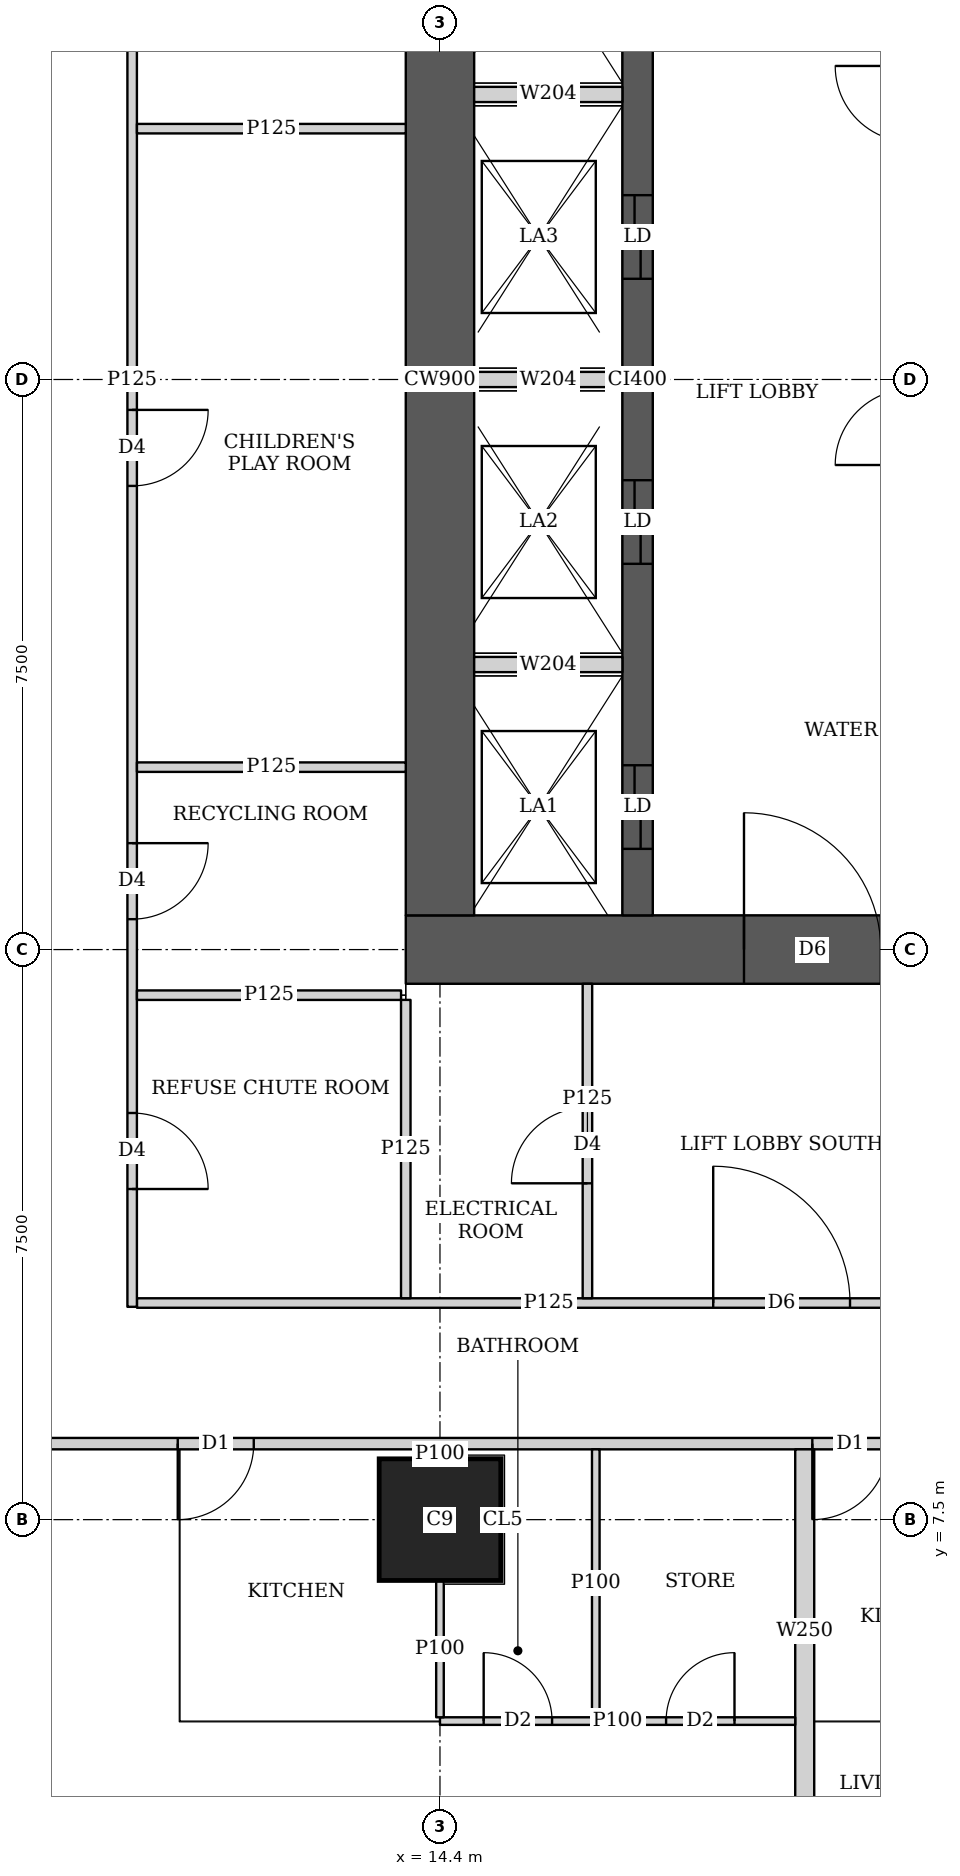
"""IFC4 building model, lengths in metres.
Left out: names, types, materials, properties, quantities, classifications, styles, units other than length and angle.
Written with IfcOpenShell. Run it as: python <this file> out.ifc"""

import sys

from ifc_helpers import new_model, si_unit, direction, frame, frame_2d, origin, origin_2d, place, context, subcontext, project, spatial, rectangle, extrude, element, fill, save


model = new_model("IFC4")
c1 = context("Model", 3, precision=1e-05, world=origin(), true_north=direction((0.0, 1.0)))
c2 = subcontext(c1, "Body", "Model", "MODEL_VIEW")
j1 = project(units=[si_unit("LENGTHUNIT", "METRE"), si_unit("PLANEANGLEUNIT", "RADIAN")], contexts=[c1])
p1 = place(None, origin())
s1 = spatial("IfcSite", under=j1, at=p1, CompositionType="ELEMENT")
p2 = place(p1, origin())
s2 = spatial("IfcBuilding", under=s1, at=p2, CompositionType="ELEMENT")
p3 = place(p2, frame((0.0, 0.0, 111.65)))
s3 = spatial("IfcBuildingStorey", under=s2, at=p3, CompositionType="ELEMENT", Elevation=111.65)
p4 = place(p3, frame((14.4, 7.5, 0.0), z_axis=(0.0, 0.0, 1.0), x_axis=(1.0, 0.0, 0.0)))
e1 = element("IfcColumn", 1, at=p4, inside=s3, PredefinedType="COLUMN", context=c2, shape_type="SweptSolid", body=[
    extrude(rectangle(XDim=1.6, YDim=1.6, at=origin_2d()), origin(), (0.0, 0.0, 1.0), 3.75),
])
p5 = place(p3, frame((13.95, 15.0, 0.0), z_axis=(0.0, 0.0, 1.0), x_axis=(1.0, 0.0, 0.0)))
e2 = element("IfcWall", 2, at=p5, inside=s3, PredefinedType="SHEAR", context=c2, shape_type="SweptSolid", body=[
    extrude(rectangle(XDim=15.3, YDim=0.9, at=frame_2d((7.65, 0.0))), origin(), (0.0, 0.0, 1.0), 3.75),
])
p6 = place(p5, frame((4.45, 0.0, 0.0)))
e3 = element("IfcOpeningElement", 3, at=p6, cuts=e2, PredefinedType="OPENING", context=c2, shape_type="SweptSolid", body=[
    extrude(rectangle(XDim=1.8, YDim=2.1, at=frame_2d((0.9, 1.05))), frame((0.0, 0.46, 0.0), z_axis=(0.0, -1.0, 0.0), x_axis=(1.0, 0.0, 0.0)), (0.0, 0.0, 1.0), 0.92),
])
p7 = place(p5, frame((10.7, 0.0, 0.0)))
e4 = element("IfcOpeningElement", 4, at=p7, cuts=e2, PredefinedType="OPENING", context=c2, shape_type="SweptSolid", body=[
    extrude(rectangle(XDim=1.1, YDim=2.1, at=frame_2d((0.55, 1.05))), frame((0.0, 0.46, 0.0), z_axis=(0.0, -1.0, 0.0), x_axis=(1.0, 0.0, 0.0)), (0.0, 0.0, 1.0), 0.92),
])
p8 = place(p3, frame((14.4, 15.45, 0.0), z_axis=(0.0, 0.0, 1.0), x_axis=(0.0, 1.0, 0.0)))
e5 = element("IfcWall", 5, at=p8, inside=s3, PredefinedType="SHEAR", context=c2, shape_type="SweptSolid", body=[
    extrude(rectangle(XDim=14.1, YDim=0.9, at=frame_2d((7.05, 0.0))), origin(), (0.0, 0.0, 1.0), 3.75),
])
p9 = place(p3, frame((17.0, 15.45, 0.0), z_axis=(0.0, 0.0, 1.0), x_axis=(0.0, 1.0, 0.0)))
e6 = element("IfcWall", 6, at=p9, inside=s3, PredefinedType="SHEAR", context=c2, shape_type="SweptSolid", body=[
    extrude(rectangle(XDim=14.1, YDim=0.4, at=frame_2d((7.05, 0.0))), origin(), (0.0, 0.0, 1.0), 3.75),
])
p10 = place(p9, frame((0.875, 0.0, 0.0)))
e7 = element("IfcOpeningElement", 7, at=p10, cuts=e6, PredefinedType="OPENING", context=c2, shape_type="SweptSolid", body=[
    extrude(rectangle(XDim=1.1, YDim=2.1, at=frame_2d((0.55, 1.05))), frame((0.0, 0.21, 0.0), z_axis=(0.0, -1.0, 0.0), x_axis=(1.0, 0.0, 0.0)), (0.0, 0.0, 1.0), 0.42),
])
p11 = place(p9, frame((4.625, 0.0, 0.0)))
e8 = element("IfcOpeningElement", 8, at=p11, cuts=e6, PredefinedType="OPENING", context=c2, shape_type="SweptSolid", body=[
    extrude(rectangle(XDim=1.1, YDim=2.1, at=frame_2d((0.55, 1.05))), frame((0.0, 0.21, 0.0), z_axis=(0.0, -1.0, 0.0), x_axis=(1.0, 0.0, 0.0)), (0.0, 0.0, 1.0), 0.42),
])
p12 = place(p9, frame((8.375, 0.0, 0.0)))
e9 = element("IfcOpeningElement", 9, at=p12, cuts=e6, PredefinedType="OPENING", context=c2, shape_type="SweptSolid", body=[
    extrude(rectangle(XDim=1.1, YDim=2.1, at=frame_2d((0.55, 1.05))), frame((0.0, 0.21, 0.0), z_axis=(0.0, -1.0, 0.0), x_axis=(1.0, 0.0, 0.0)), (0.0, 0.0, 1.0), 0.42),
])
p13 = place(p9, frame((12.125, 0.0, 0.0)))
e10 = element("IfcOpeningElement", 10, at=p13, cuts=e6, PredefinedType="OPENING", context=c2, shape_type="SweptSolid", body=[
    extrude(rectangle(XDim=1.1, YDim=2.1, at=frame_2d((0.55, 1.05))), frame((0.0, 0.21, 0.0), z_axis=(0.0, -1.0, 0.0), x_axis=(1.0, 0.0, 0.0)), (0.0, 0.0, 1.0), 0.42),
])
p14 = place(p3, frame((40.053, 8.5, 0.0), z_axis=(0.0, 0.0, 1.0), x_axis=(-1.0, 0.0, 0.0)))
e11 = element("IfcWall", 11, at=p14, inside=s3, PredefinedType="SOLIDWALL", context=c2, shape_type="SweptSolid", body=[
    extrude(rectangle(XDim=31.703, YDim=0.15, at=frame_2d((15.852, 0.0))), origin(), (0.0, 0.0, 1.0), 3.5),
])
p15 = place(p14, frame((28.103, 0.0, 0.0)))
e12 = element("IfcOpeningElement", 12, at=p15, cuts=e11, PredefinedType="OPENING", context=c2, shape_type="SweptSolid", body=[
    extrude(rectangle(XDim=1.0, YDim=2.1, at=frame_2d((0.5, 1.05))), frame((0.0, 0.085, 0.0), z_axis=(0.0, -1.0, 0.0), x_axis=(1.0, 0.0, 0.0)), (0.0, 0.0, 1.0), 0.17),
])
p16 = place(p14, frame((19.754, 0.0, 0.0)))
e13 = element("IfcOpeningElement", 13, at=p16, cuts=e11, PredefinedType="OPENING", context=c2, shape_type="SweptSolid", body=[
    extrude(rectangle(XDim=1.0, YDim=2.1, at=frame_2d((0.5, 1.05))), frame((0.0, 0.085, 0.0), z_axis=(0.0, -1.0, 0.0), x_axis=(1.0, 0.0, 0.0)), (0.0, 0.0, 1.0), 0.17),
])
p17 = place(p14, frame((8.353, 0.0, 0.0)))
e14 = element("IfcOpeningElement", 14, at=p17, cuts=e11, PredefinedType="OPENING", context=c2, shape_type="SweptSolid", body=[
    extrude(rectangle(XDim=1.0, YDim=2.1, at=frame_2d((0.5, 1.05))), frame((0.0, 0.085, 0.0), z_axis=(0.0, -1.0, 0.0), x_axis=(1.0, 0.0, 0.0)), (0.0, 0.0, 1.0), 0.17),
])
p18 = place(p3, frame((19.074, 4.85, 0.0), z_axis=(0.0, 0.0, 1.0), x_axis=(-1.0, 0.0, 0.0)))
e15 = element("IfcWall", 15, at=p18, inside=s3, PredefinedType="PARTITIONING", context=c2, shape_type="SweptSolid", body=[
    extrude(rectangle(XDim=4.674, YDim=0.1, at=frame_2d((2.337, 0.0))), origin(), (0.0, 0.0, 1.0), 3.5),
])
p19 = place(p18, frame((3.199, 0.0, 0.0)))
e16 = element("IfcOpeningElement", 16, at=p19, cuts=e15, PredefinedType="OPENING", context=c2, shape_type="SweptSolid", body=[
    extrude(rectangle(XDim=0.9, YDim=2.1, at=frame_2d((0.45, 1.05))), frame((0.0, 0.06, 0.0), z_axis=(0.0, -1.0, 0.0), x_axis=(1.0, 0.0, 0.0)), (0.0, 0.0, 1.0), 0.12),
])
p20 = place(p18, frame((0.799, 0.0, 0.0)))
e17 = element("IfcOpeningElement", 17, at=p20, cuts=e15, PredefinedType="OPENING", context=c2, shape_type="SweptSolid", body=[
    extrude(rectangle(XDim=0.9, YDim=2.1, at=frame_2d((0.45, 1.05))), frame((0.0, 0.06, 0.0), z_axis=(0.0, -1.0, 0.0), x_axis=(1.0, 0.0, 0.0)), (0.0, 0.0, 1.0), 0.12),
])
p21 = place(p3, frame((14.4, 4.9, 0.0), z_axis=(0.0, 0.0, 1.0), x_axis=(0.0, 1.0, 0.0)))
e18 = element("IfcWall", 18, at=p21, inside=s3, PredefinedType="PARTITIONING", context=c2, shape_type="SweptSolid", body=[
    extrude(rectangle(XDim=1.799, YDim=0.1, at=frame_2d((0.899, 0.0))), origin(), (0.0, 0.0, 1.0), 3.5),
])
p22 = place(p3, frame((14.4, 8.301, 0.0), z_axis=(0.0, 0.0, 1.0), x_axis=(0.0, 1.0, 0.0)))
e19 = element("IfcWall", 19, at=p22, inside=s3, PredefinedType="PARTITIONING", context=c2, shape_type="SweptSolid", body=[
    extrude(rectangle(XDim=0.124, YDim=0.1, at=frame_2d((0.062, 0.0))), origin(), (0.0, 0.0, 1.0), 3.5),
])
p23 = place(p3, frame((16.45, 4.9, 0.0), z_axis=(0.0, 0.0, 1.0), x_axis=(0.0, 1.0, 0.0)))
e20 = element("IfcWall", 20, at=p23, inside=s3, PredefinedType="PARTITIONING", context=c2, shape_type="SweptSolid", body=[
    extrude(rectangle(XDim=3.525, YDim=0.1, at=frame_2d((1.763, 0.0))), origin(), (0.0, 0.0, 1.0), 3.5),
])
p24 = place(p3, frame((19.199, 3.65, 0.0), z_axis=(0.0, 0.0, 1.0), x_axis=(0.0, 1.0, 0.0)))
e21 = element("IfcWall", 21, at=p24, inside=s3, PredefinedType="SOLIDWALL", context=c2, shape_type="SweptSolid", body=[
    extrude(rectangle(XDim=4.775, YDim=0.25, at=frame_2d((2.388, 0.0))), origin(), (0.0, 0.0, 1.0), 3.5),
])
p25 = place(p3, frame((10.35, 10.3, 0.0), z_axis=(0.0, 0.0, 1.0), x_axis=(0.0, 1.0, 0.0)))
e22 = element("IfcWall", 22, at=p25, inside=s3, PredefinedType="PARTITIONING", context=c2, shape_type="SweptSolid", body=[
    extrude(rectangle(XDim=24.4, YDim=0.125, at=frame_2d((12.2, 0.0))), origin(), (0.0, 0.0, 1.0), 3.5),
])
p26 = place(p25, frame((1.55, 0.0, 0.0)))
e23 = element("IfcOpeningElement", 23, at=p26, cuts=e22, PredefinedType="OPENING", context=c2, shape_type="SweptSolid", body=[
    extrude(rectangle(XDim=1.0, YDim=2.1, at=frame_2d((0.5, 1.05))), frame((0.0, 0.073, 0.0), z_axis=(0.0, -1.0, 0.0), x_axis=(1.0, 0.0, 0.0)), (0.0, 0.0, 1.0), 0.145),
])
p27 = place(p25, frame((5.1, 0.0, 0.0)))
e24 = element("IfcOpeningElement", 24, at=p27, cuts=e22, PredefinedType="OPENING", context=c2, shape_type="SweptSolid", body=[
    extrude(rectangle(XDim=1.0, YDim=2.1, at=frame_2d((0.5, 1.05))), frame((0.0, 0.073, 0.0), z_axis=(0.0, -1.0, 0.0), x_axis=(1.0, 0.0, 0.0)), (0.0, 0.0, 1.0), 0.145),
])
p28 = place(p25, frame((10.8, 0.0, 0.0)))
e25 = element("IfcOpeningElement", 25, at=p28, cuts=e22, PredefinedType="OPENING", context=c2, shape_type="SweptSolid", body=[
    extrude(rectangle(XDim=1.0, YDim=2.1, at=frame_2d((0.5, 1.05))), frame((0.0, 0.073, 0.0), z_axis=(0.0, -1.0, 0.0), x_axis=(1.0, 0.0, 0.0)), (0.0, 0.0, 1.0), 0.145),
])
p29 = place(p25, frame((18.1, 0.0, 0.0)))
e26 = element("IfcOpeningElement", 26, at=p29, cuts=e22, PredefinedType="OPENING", context=c2, shape_type="SweptSolid", body=[
    extrude(rectangle(XDim=1.0, YDim=2.1, at=frame_2d((0.5, 1.05))), frame((0.0, 0.073, 0.0), z_axis=(0.0, -1.0, 0.0), x_axis=(1.0, 0.0, 0.0)), (0.0, 0.0, 1.0), 0.145),
])
p30 = place(p25, frame((22.55, 0.0, 0.0)))
e27 = element("IfcOpeningElement", 27, at=p30, cuts=e22, PredefinedType="OPENING", context=c2, shape_type="SweptSolid", body=[
    extrude(rectangle(XDim=1.0, YDim=2.1, at=frame_2d((0.5, 1.05))), frame((0.0, 0.073, 0.0), z_axis=(0.0, -1.0, 0.0), x_axis=(1.0, 0.0, 0.0)), (0.0, 0.0, 1.0), 0.145),
])
p31 = place(p3, frame((10.413, 14.4, 0.0), z_axis=(0.0, 0.0, 1.0), x_axis=(1.0, 0.0, 0.0)))
e28 = element("IfcWall", 28, at=p31, inside=s3, PredefinedType="PARTITIONING", context=c2, shape_type="SweptSolid", body=[
    extrude(rectangle(XDim=3.475, YDim=0.125, at=frame_2d((1.737, 0.0))), origin(), (0.0, 0.0, 1.0), 3.5),
])
for number, where, z_axis, x_axis in (
    (29, (10.413, 17.4, 0.0), (0.0, 0.0, 1.0), (1.0, 0.0, 0.0)),
    (30, (10.413, 25.8, 0.0), (0.0, 0.0, 1.0), (1.0, 0.0, 0.0)),
):
    element("IfcWall", number, at=place(p3, frame(where, z_axis=z_axis, x_axis=x_axis)), inside=s3, PredefinedType="PARTITIONING", context=c2, shape_type="SweptSolid", body=[
        extrude(rectangle(XDim=3.537, YDim=0.125, at=frame_2d((1.769, 0.0))), origin(), (0.0, 0.0, 1.0), 3.5),
    ])
p32 = place(p3, frame((13.95, 10.413, 0.0), z_axis=(0.0, 0.0, 1.0), x_axis=(0.0, 1.0, 0.0)))
e31 = element("IfcWall", 31, at=p32, inside=s3, PredefinedType="PARTITIONING", context=c2, shape_type="SweptSolid", body=[
    extrude(rectangle(XDim=3.925, YDim=0.125, at=frame_2d((1.962, 0.0))), origin(), (0.0, 0.0, 1.0), 3.5),
])
p33 = place(p3, frame((10.413, 10.35, 0.0), z_axis=(0.0, 0.0, 1.0), x_axis=(1.0, 0.0, 0.0)))
e32 = element("IfcWall", 32, at=p33, inside=s3, PredefinedType="PARTITIONING", context=c2, shape_type="SweptSolid", body=[
    extrude(rectangle(XDim=10.837, YDim=0.125, at=frame_2d((5.418, 0.0))), origin(), (0.0, 0.0, 1.0), 3.5),
])
p34 = place(p33, frame((7.582, 0.0, 0.0)))
e33 = element("IfcOpeningElement", 33, at=p34, cuts=e32, PredefinedType="OPENING", context=c2, shape_type="SweptSolid", body=[
    extrude(rectangle(XDim=1.8, YDim=2.1, at=frame_2d((0.9, 1.05))), frame((0.0, 0.073, 0.0), z_axis=(0.0, -1.0, 0.0), x_axis=(1.0, 0.0, 0.0)), (0.0, 0.0, 1.0), 0.145),
])
p35 = place(p3, frame((16.34, 10.413, 0.0), z_axis=(0.0, 0.0, 1.0), x_axis=(0.0, 1.0, 0.0)))
e34 = element("IfcWall", 34, at=p35, inside=s3, PredefinedType="PARTITIONING", context=c2, shape_type="SweptSolid", body=[
    extrude(rectangle(XDim=4.137, YDim=0.125, at=frame_2d((2.068, 0.0))), origin(), (0.0, 0.0, 1.0), 3.5),
])
p36 = place(p35, frame((1.512, 0.0, 0.0)))
e35 = element("IfcOpeningElement", 35, at=p36, cuts=e34, PredefinedType="OPENING", context=c2, shape_type="SweptSolid", body=[
    extrude(rectangle(XDim=1.0, YDim=2.1, at=frame_2d((0.5, 1.05))), frame((0.0, 0.073, 0.0), z_axis=(0.0, -1.0, 0.0), x_axis=(1.0, 0.0, 0.0)), (0.0, 0.0, 1.0), 0.145),
])
for number, where, z_axis, x_axis in (
    (36, (14.85, 18.75, 0.0), (0.0, 0.0, 1.0), (1.0, 0.0, 0.0)),
    (37, (14.85, 22.5, 0.0), (0.0, 0.0, 1.0), (1.0, 0.0, 0.0)),
    (38, (14.85, 26.25, 0.0), (0.0, 0.0, 1.0), (1.0, 0.0, 0.0)),
):
    element("IfcWall", number, at=place(p3, frame(where, z_axis=z_axis, x_axis=x_axis)), inside=s3, PredefinedType="SOLIDWALL", context=c2, shape_type="SweptSolid", body=[
        extrude(rectangle(XDim=1.95, YDim=0.2, at=frame_2d((0.975, 0.0))), origin(), (0.0, 0.0, 1.0), 3.5),
    ])
p37 = place(p19, origin())
e39 = element("IfcDoor", 39, at=p37, inside=s3, OperationType="SINGLE_SWING_LEFT", PredefinedType="DOOR", context=c2, shape_type="SweptSolid", body=[
    extrude(rectangle(XDim=0.9, YDim=2.1, at=frame_2d((0.45, 1.05))), frame((0.0, 0.025, 0.0), z_axis=(0.0, -1.0, 0.0), x_axis=(1.0, 0.0, 0.0)), (0.0, 0.0, 1.0), 0.05),
])
fill(e16, e39)
p38 = place(p20, origin())
e40 = element("IfcDoor", 40, at=p38, inside=s3, OperationType="SINGLE_SWING_RIGHT", PredefinedType="DOOR", context=c2, shape_type="SweptSolid", body=[
    extrude(rectangle(XDim=0.9, YDim=2.1, at=frame_2d((0.45, 1.05))), frame((0.0, 0.025, 0.0), z_axis=(0.0, -1.0, 0.0), x_axis=(1.0, 0.0, 0.0)), (0.0, 0.0, 1.0), 0.05),
])
fill(e17, e40)
p39 = place(p15, origin())
e41 = element("IfcDoor", 41, at=p39, inside=s3, OperationType="SINGLE_SWING_RIGHT", PredefinedType="DOOR", context=c2, shape_type="SweptSolid", body=[
    extrude(rectangle(XDim=1.0, YDim=2.1, at=frame_2d((0.5, 1.05))), frame((0.0, 0.025, 0.0), z_axis=(0.0, -1.0, 0.0), x_axis=(1.0, 0.0, 0.0)), (0.0, 0.0, 1.0), 0.05),
])
fill(e12, e41)
p40 = place(p16, origin())
e42 = element("IfcDoor", 42, at=p40, inside=s3, OperationType="SINGLE_SWING_RIGHT", PredefinedType="DOOR", context=c2, shape_type="SweptSolid", body=[
    extrude(rectangle(XDim=1.0, YDim=2.1, at=frame_2d((0.5, 1.05))), frame((0.0, 0.025, 0.0), z_axis=(0.0, -1.0, 0.0), x_axis=(1.0, 0.0, 0.0)), (0.0, 0.0, 1.0), 0.05),
])
fill(e13, e42)
p41 = place(p26, origin())
e43 = element("IfcDoor", 43, at=p41, inside=s3, OperationType="SINGLE_SWING_RIGHT", PredefinedType="DOOR", context=c2, shape_type="SweptSolid", body=[
    extrude(rectangle(XDim=1.0, YDim=2.1, at=frame_2d((0.5, 1.05))), frame((0.0, 0.025, 0.0), z_axis=(0.0, -1.0, 0.0), x_axis=(1.0, 0.0, 0.0)), (0.0, 0.0, 1.0), 0.05),
])
fill(e23, e43)
p42 = place(p27, origin())
e44 = element("IfcDoor", 44, at=p42, inside=s3, OperationType="SINGLE_SWING_LEFT", PredefinedType="DOOR", context=c2, shape_type="SweptSolid", body=[
    extrude(rectangle(XDim=1.0, YDim=2.1, at=frame_2d((0.5, 1.05))), frame((0.0, 0.025, 0.0), z_axis=(0.0, -1.0, 0.0), x_axis=(1.0, 0.0, 0.0)), (0.0, 0.0, 1.0), 0.05),
])
fill(e24, e44)
p43 = place(p28, origin())
e45 = element("IfcDoor", 45, at=p43, inside=s3, OperationType="SINGLE_SWING_LEFT", PredefinedType="DOOR", context=c2, shape_type="SweptSolid", body=[
    extrude(rectangle(XDim=1.0, YDim=2.1, at=frame_2d((0.5, 1.05))), frame((0.0, 0.025, 0.0), z_axis=(0.0, -1.0, 0.0), x_axis=(1.0, 0.0, 0.0)), (0.0, 0.0, 1.0), 0.05),
])
fill(e25, e45)
p44 = place(p36, origin())
e46 = element("IfcDoor", 46, at=p44, inside=s3, OperationType="SINGLE_SWING_LEFT", PredefinedType="DOOR", context=c2, shape_type="SweptSolid", body=[
    extrude(rectangle(XDim=1.0, YDim=2.1, at=frame_2d((0.5, 1.05))), frame((0.0, 0.025, 0.0), z_axis=(0.0, -1.0, 0.0), x_axis=(1.0, 0.0, 0.0)), (0.0, 0.0, 1.0), 0.05),
])
fill(e35, e46)
p45 = place(p34, origin())
e47 = element("IfcDoor", 47, at=p45, inside=s3, OperationType="DOUBLE_DOOR_SINGLE_SWING", PredefinedType="DOOR", context=c2, shape_type="SweptSolid", body=[
    extrude(rectangle(XDim=1.8, YDim=2.1, at=frame_2d((0.9, 1.05))), frame((0.0, 0.025, 0.0), z_axis=(0.0, -1.0, 0.0), x_axis=(1.0, 0.0, 0.0)), (0.0, 0.0, 1.0), 0.05),
])
fill(e33, e47)
p46 = place(p6, origin())
e48 = element("IfcDoor", 48, at=p46, inside=s3, OperationType="DOUBLE_DOOR_SINGLE_SWING", PredefinedType="DOOR", context=c2, shape_type="SweptSolid", body=[
    extrude(rectangle(XDim=1.8, YDim=2.1, at=frame_2d((0.9, 1.05))), frame((0.0, 0.025, 0.0), z_axis=(0.0, -1.0, 0.0), x_axis=(1.0, 0.0, 0.0)), (0.0, 0.0, 1.0), 0.05),
])
fill(e3, e48)
p47 = place(p10, origin())
e49 = element("IfcDoor", 49, at=p47, inside=s3, OperationType="DOUBLE_DOOR_SLIDING", PredefinedType="DOOR", context=c2, shape_type="SweptSolid", body=[
    extrude(rectangle(XDim=1.1, YDim=2.1, at=frame_2d((0.55, 1.05))), frame((0.0, 0.025, 0.0), z_axis=(0.0, -1.0, 0.0), x_axis=(1.0, 0.0, 0.0)), (0.0, 0.0, 1.0), 0.05),
])
fill(e7, e49)
p48 = place(p11, origin())
e50 = element("IfcDoor", 50, at=p48, inside=s3, OperationType="DOUBLE_DOOR_SLIDING", PredefinedType="DOOR", context=c2, shape_type="SweptSolid", body=[
    extrude(rectangle(XDim=1.1, YDim=2.1, at=frame_2d((0.55, 1.05))), frame((0.0, 0.025, 0.0), z_axis=(0.0, -1.0, 0.0), x_axis=(1.0, 0.0, 0.0)), (0.0, 0.0, 1.0), 0.05),
])
fill(e8, e50)
p49 = place(p12, origin())
e51 = element("IfcDoor", 51, at=p49, inside=s3, OperationType="DOUBLE_DOOR_SLIDING", PredefinedType="DOOR", context=c2, shape_type="SweptSolid", body=[
    extrude(rectangle(XDim=1.1, YDim=2.1, at=frame_2d((0.55, 1.05))), frame((0.0, 0.025, 0.0), z_axis=(0.0, -1.0, 0.0), x_axis=(1.0, 0.0, 0.0)), (0.0, 0.0, 1.0), 0.05),
])
fill(e9, e51)
save(model, sys.argv[1])
